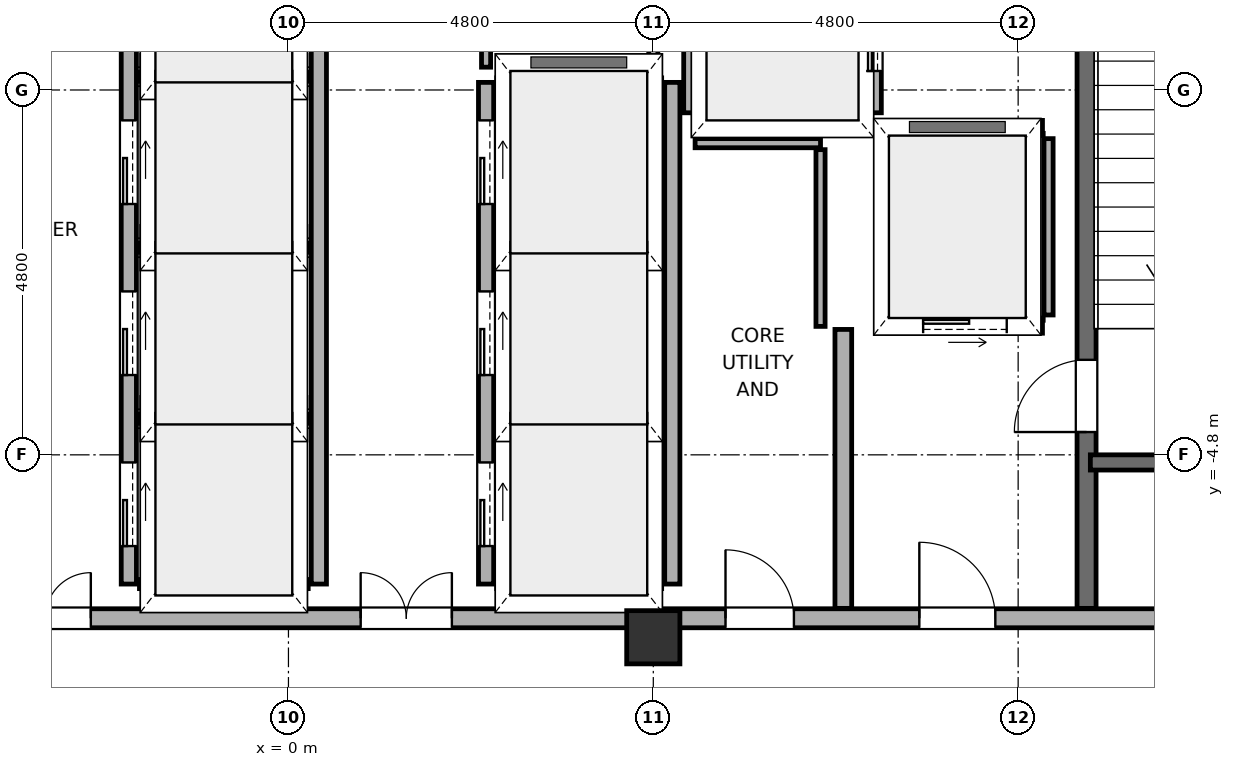
"""IFC4 building model, lengths in metres.
Left out: names, types, materials, properties, quantities, classifications, styles, units other than length and angle.
Written with IfcOpenShell. Run it as: python <this file> out.ifc"""

import sys

from ifc_helpers import new_model, si_unit, direction, frame, frame_2d, origin, origin_2d, place, context, subcontext, project, spatial, rectangle, hollow_rectangle, extrude, element, fill, save


model = new_model("IFC4")
c1 = context("Model", 3, precision=1e-05, world=origin(), true_north=direction((0.0, 1.0)))
c2 = subcontext(c1, "Body", "Model", "MODEL_VIEW")
j1 = project(units=[si_unit("LENGTHUNIT", "METRE"), si_unit("PLANEANGLEUNIT", "RADIAN")], contexts=[c1])
p1 = place(None, origin())
s1 = spatial("IfcSite", under=j1, at=p1, CompositionType="ELEMENT")
p2 = place(p1, origin())
s2 = spatial("IfcBuilding", under=s1, at=p2, CompositionType="ELEMENT")
p3 = place(p2, frame((0.0, 0.0, 180.3)))
s3 = spatial("IfcBuildingStorey", under=s2, at=p3, CompositionType="ELEMENT", Elevation=180.3)
p4 = place(p3, frame((4.8, -7.2, 0.0), z_axis=(0.0, 0.0, 1.0), x_axis=(1.0, 0.0, 0.0)))
e1 = element("IfcColumn", 1, at=p4, inside=s3, PredefinedType="COLUMN", context=c2, shape_type="SweptSolid", body=[
    extrude(hollow_rectangle(XDim=0.7, YDim=0.7, WallThickness=0.032, at=origin_2d()), origin(), (0.0, 0.0, 1.0), 5.2),
])
p5 = place(p3, frame((-4.6, -6.95, 0.0), z_axis=(0.0, 0.0, 1.0), x_axis=(1.0, 0.0, 0.0)))
e2 = element("IfcWall", 2, at=p5, inside=s3, PredefinedType="SOLIDWALL", context=c2, shape_type="SweptSolid", body=[
    extrude(rectangle(XDim=9.2, YDim=0.25, at=frame_2d((4.6, 0.0))), origin(), (0.0, 0.0, 1.0), 3.75),
])
p6 = place(p5, frame((0.8, 0.0, 0.0)))
e3 = element("IfcOpeningElement", 3, at=p6, cuts=e2, PredefinedType="OPENING", context=c2, shape_type="SweptSolid", body=[
    extrude(rectangle(XDim=1.2, YDim=2.2, at=frame_2d((0.6, 1.1))), frame((0.0, 0.14, 0.0), z_axis=(0.0, -1.0, 0.0), x_axis=(1.0, 0.0, 0.0)), (0.0, 0.0, 1.0), 0.28),
])
p7 = place(p5, frame((5.55, 0.0, 0.0)))
e4 = element("IfcOpeningElement", 4, at=p7, cuts=e2, PredefinedType="OPENING", context=c2, shape_type="SweptSolid", body=[
    extrude(rectangle(XDim=1.2, YDim=2.2, at=frame_2d((0.6, 1.1))), frame((0.0, 0.14, 0.0), z_axis=(0.0, -1.0, 0.0), x_axis=(1.0, 0.0, 0.0)), (0.0, 0.0, 1.0), 0.28),
])
p8 = place(p3, frame((4.8, -6.95, 0.0), z_axis=(0.0, 0.0, 1.0), x_axis=(1.0, 0.0, 0.0)))
e5 = element("IfcWall", 5, at=p8, inside=s3, PredefinedType="SOLIDWALL", context=c2, shape_type="SweptSolid", body=[
    extrude(rectangle(XDim=9.4, YDim=0.25, at=frame_2d((4.7, 0.0))), origin(), (0.0, 0.0, 1.0), 3.55),
])
p9 = place(p8, frame((3.5, 0.0, 0.0)))
e6 = element("IfcOpeningElement", 6, at=p9, cuts=e5, PredefinedType="OPENING", context=c2, shape_type="SweptSolid", body=[
    extrude(rectangle(XDim=1.0, YDim=2.15, at=frame_2d((0.5, 1.075))), frame((0.0, 0.14, 0.0), z_axis=(0.0, -1.0, 0.0), x_axis=(1.0, 0.0, 0.0)), (0.0, 0.0, 1.0), 0.28),
])
p10 = place(p8, frame((0.95, 0.0, 0.0)))
e7 = element("IfcOpeningElement", 7, at=p10, cuts=e5, PredefinedType="OPENING", context=c2, shape_type="SweptSolid", body=[
    extrude(rectangle(XDim=0.9, YDim=2.1, at=frame_2d((0.45, 1.05))), frame((0.0, 0.14, 0.0), z_axis=(0.0, -1.0, 0.0), x_axis=(1.0, 0.0, 0.0)), (0.0, 0.0, 1.0), 0.28),
])
p11 = place(p3, frame((7.3, -6.82, 0.0), z_axis=(0.0, 0.0, 1.0), x_axis=(0.0, 1.0, 0.0)))
e8 = element("IfcWall", 8, at=p11, inside=s3, PredefinedType="SOLIDWALL", context=c2, shape_type="SweptSolid", body=[
    extrude(rectangle(XDim=3.67, YDim=0.22, at=frame_2d((1.835, 0.0))), origin(), (0.0, 0.0, 1.0), 3.55),
])
p12 = place(p3, frame((10.5, -6.82, -0.22), z_axis=(0.0, 0.0, 1.0), x_axis=(0.0, 1.0, 0.0)))
e9 = element("IfcWall", 9, at=p12, inside=s3, PredefinedType="SOLIDWALL", context=c2, shape_type="SweptSolid", body=[
    extrude(rectangle(XDim=13.64, YDim=0.25, at=frame_2d((6.82, 0.0))), origin(), (0.0, 0.0, 1.0), 5.17),
])
p13 = place(p12, frame((2.32, 0.0, 0.22)))
e10 = element("IfcOpeningElement", 10, at=p13, cuts=e9, PredefinedType="OPENING", context=c2, shape_type="SweptSolid", body=[
    extrude(rectangle(XDim=0.95, YDim=2.15, at=frame_2d((0.475, 1.075))), frame((0.0, 0.14, 0.0), z_axis=(0.0, -1.0, 0.0), x_axis=(1.0, 0.0, 0.0)), (0.0, 0.0, 1.0), 0.28),
])
p14 = place(p3, frame((10.55, -4.9, -0.22), z_axis=(0.0, 0.0, 1.0), x_axis=(1.0, 0.0, 0.0)))
e11 = element("IfcWall", 11, at=p14, inside=s3, PredefinedType="SOLIDWALL", context=c2, shape_type="SweptSolid", body=[
    extrude(rectangle(XDim=3.65, YDim=0.2, at=frame_2d((1.825, 0.0))), origin(), (0.0, 0.0, 1.0), 5.17),
])
p15 = place(p3, frame((-2.1, -6.5, 0.0), z_axis=(0.0, 0.0, 1.0), x_axis=(0.0, 1.0, 0.0)))
e12 = element("IfcWall", 12, at=p15, inside=s3, PredefinedType="SOLIDWALL", context=c2, shape_type="SweptSolid", body=[
    extrude(rectangle(XDim=8.85, YDim=0.2, at=frame_2d((4.425, 0.0))), origin(), (0.0, 0.0, 1.0), 4.95),
])
p16 = place(p15, frame((0.5, 0.0, 0.0)))
e13 = element("IfcOpeningElement", 13, at=p16, cuts=e12, PredefinedType="OPENING", context=c2, shape_type="SweptSolid", body=[
    extrude(rectangle(XDim=1.1, YDim=2.2, at=frame_2d((0.55, 1.1))), frame((0.0, 0.115, 0.0), z_axis=(0.0, -1.0, 0.0), x_axis=(1.0, 0.0, 0.0)), (0.0, 0.0, 1.0), 0.23),
])
p17 = place(p15, frame((2.75, 0.0, 0.0)))
e14 = element("IfcOpeningElement", 14, at=p17, cuts=e12, PredefinedType="OPENING", context=c2, shape_type="SweptSolid", body=[
    extrude(rectangle(XDim=1.1, YDim=2.2, at=frame_2d((0.55, 1.1))), frame((0.0, 0.115, 0.0), z_axis=(0.0, -1.0, 0.0), x_axis=(1.0, 0.0, 0.0)), (0.0, 0.0, 1.0), 0.23),
])
p18 = place(p15, frame((5.0, 0.0, 0.0)))
e15 = element("IfcOpeningElement", 15, at=p18, cuts=e12, PredefinedType="OPENING", context=c2, shape_type="SweptSolid", body=[
    extrude(rectangle(XDim=1.1, YDim=2.2, at=frame_2d((0.55, 1.1))), frame((0.0, 0.115, 0.0), z_axis=(0.0, -1.0, 0.0), x_axis=(1.0, 0.0, 0.0)), (0.0, 0.0, 1.0), 0.23),
])
p19 = place(p15, frame((7.25, 0.0, 0.0)))
e16 = element("IfcOpeningElement", 16, at=p19, cuts=e12, PredefinedType="OPENING", context=c2, shape_type="SweptSolid", body=[
    extrude(rectangle(XDim=1.1, YDim=2.2, at=frame_2d((0.55, 1.1))), frame((0.0, 0.115, 0.0), z_axis=(0.0, -1.0, 0.0), x_axis=(1.0, 0.0, 0.0)), (0.0, 0.0, 1.0), 0.23),
])
p20 = place(p3, frame((0.4, -6.5, 0.0), z_axis=(0.0, 0.0, 1.0), x_axis=(0.0, 1.0, 0.0)))
e17 = element("IfcWall", 17, at=p20, inside=s3, PredefinedType="SOLIDWALL", context=c2, shape_type="SweptSolid", body=[
    extrude(rectangle(XDim=8.85, YDim=0.2, at=frame_2d((4.425, 0.0))), origin(), (0.0, 0.0, 1.0), 4.95),
])
for number, where, z_axis, x_axis in (
    (18, (-1.96, -6.5, 0.0), (0.0, 0.0, 1.0), (1.0, 0.0, 0.0)),
    (19, (-1.96, -4.325, 0.0), (0.0, 0.0, 1.0), (1.0, 0.0, 0.0)),
    (20, (-1.96, -2.075, 0.0), (0.0, 0.0, 1.0), (1.0, 0.0, 0.0)),
    (21, (-1.96, 0.175, 0.0), (0.0, 0.0, 1.0), (1.0, 0.0, 0.0)),
):
    element("IfcWall", number, at=place(p3, frame(where, z_axis=z_axis, x_axis=x_axis)), inside=s3, PredefinedType="PARTITIONING", context=c2, shape_type="SweptSolid", body=[
        extrude(rectangle(XDim=2.22, YDim=0.12, at=frame_2d((1.11, 0.0))), origin(), (0.0, 0.0, 1.0), 4.95),
    ])
p21 = place(p3, frame((2.6, -6.5, 0.0), z_axis=(0.0, 0.0, 1.0), x_axis=(0.0, 1.0, 0.0)))
e22 = element("IfcWall", 22, at=p21, inside=s3, PredefinedType="SOLIDWALL", context=c2, shape_type="SweptSolid", body=[
    extrude(rectangle(XDim=6.6, YDim=0.2, at=frame_2d((3.3, 0.0))), origin(), (0.0, 0.0, 1.0), 4.95),
])
p22 = place(p21, frame((0.5, 0.0, 0.0)))
e23 = element("IfcOpeningElement", 23, at=p22, cuts=e22, PredefinedType="OPENING", context=c2, shape_type="SweptSolid", body=[
    extrude(rectangle(XDim=1.1, YDim=2.2, at=frame_2d((0.55, 1.1))), frame((0.0, 0.115, 0.0), z_axis=(0.0, -1.0, 0.0), x_axis=(1.0, 0.0, 0.0)), (0.0, 0.0, 1.0), 0.23),
])
p23 = place(p21, frame((2.75, 0.0, 0.0)))
e24 = element("IfcOpeningElement", 24, at=p23, cuts=e22, PredefinedType="OPENING", context=c2, shape_type="SweptSolid", body=[
    extrude(rectangle(XDim=1.1, YDim=2.2, at=frame_2d((0.55, 1.1))), frame((0.0, 0.115, 0.0), z_axis=(0.0, -1.0, 0.0), x_axis=(1.0, 0.0, 0.0)), (0.0, 0.0, 1.0), 0.23),
])
p24 = place(p21, frame((5.0, 0.0, 0.0)))
e25 = element("IfcOpeningElement", 25, at=p24, cuts=e22, PredefinedType="OPENING", context=c2, shape_type="SweptSolid", body=[
    extrude(rectangle(XDim=1.1, YDim=2.2, at=frame_2d((0.55, 1.1))), frame((0.0, 0.115, 0.0), z_axis=(0.0, -1.0, 0.0), x_axis=(1.0, 0.0, 0.0)), (0.0, 0.0, 1.0), 0.23),
])
p25 = place(p3, frame((5.05, -6.5, 0.0), z_axis=(0.0, 0.0, 1.0), x_axis=(0.0, 1.0, 0.0)))
e26 = element("IfcWall", 26, at=p25, inside=s3, PredefinedType="SOLIDWALL", context=c2, shape_type="SweptSolid", body=[
    extrude(rectangle(XDim=6.6, YDim=0.2, at=frame_2d((3.3, 0.0))), origin(), (0.0, 0.0, 1.0), 4.95),
])
for number, where, z_axis, x_axis in (
    (27, (2.74, -6.5, 0.0), (0.0, 0.0, 1.0), (1.0, 0.0, 0.0)),
    (28, (2.74, -4.325, 0.0), (0.0, 0.0, 1.0), (1.0, 0.0, 0.0)),
    (29, (2.74, -2.075, 0.0), (0.0, 0.0, 1.0), (1.0, 0.0, 0.0)),
    (30, (2.74, 0.1, 0.0), (0.0, 0.0, 1.0), (1.0, 0.0, 0.0)),
):
    element("IfcWall", number, at=place(p3, frame(where, z_axis=z_axis, x_axis=x_axis)), inside=s3, PredefinedType="PARTITIONING", context=c2, shape_type="SweptSolid", body=[
        extrude(rectangle(XDim=2.17, YDim=0.12, at=frame_2d((1.085, 0.0))), origin(), (0.0, 0.0, 1.0), 4.95),
    ])
p26 = place(p3, frame((7.7, -0.3, 0.0), z_axis=(0.0, 0.0, 1.0), x_axis=(0.0, 1.0, 0.0)))
e31 = element("IfcWall", 31, at=p26, inside=s3, PredefinedType="SOLIDWALL", context=c2, shape_type="SweptSolid", body=[
    extrude(rectangle(XDim=6.8, YDim=0.2, at=frame_2d((3.4, 0.0))), origin(), (0.0, 0.0, 1.0), 4.95),
])
p27 = place(p26, frame((0.55, 0.0, 0.0)))
e32 = element("IfcOpeningElement", 32, at=p27, cuts=e31, PredefinedType="OPENING", context=c2, shape_type="SweptSolid", body=[
    extrude(rectangle(XDim=1.1, YDim=2.2, at=frame_2d((0.55, 1.1))), frame((0.0, 0.115, 0.0), z_axis=(0.0, -1.0, 0.0), x_axis=(1.0, 0.0, 0.0)), (0.0, 0.0, 1.0), 0.23),
])
p28 = place(p26, frame((2.9, 0.0, 0.0)))
e33 = element("IfcOpeningElement", 33, at=p28, cuts=e31, PredefinedType="OPENING", context=c2, shape_type="SweptSolid", body=[
    extrude(rectangle(XDim=1.1, YDim=2.2, at=frame_2d((0.55, 1.1))), frame((0.0, 0.115, 0.0), z_axis=(0.0, -1.0, 0.0), x_axis=(1.0, 0.0, 0.0)), (0.0, 0.0, 1.0), 0.23),
])
p29 = place(p26, frame((5.2, 0.0, 0.0)))
e34 = element("IfcOpeningElement", 34, at=p29, cuts=e31, PredefinedType="OPENING", context=c2, shape_type="SweptSolid", body=[
    extrude(rectangle(XDim=1.1, YDim=2.2, at=frame_2d((0.55, 1.1))), frame((0.0, 0.115, 0.0), z_axis=(0.0, -1.0, 0.0), x_axis=(1.0, 0.0, 0.0)), (0.0, 0.0, 1.0), 0.23),
])
p30 = place(p3, frame((5.3, -0.3, 0.0), z_axis=(0.0, 0.0, 1.0), x_axis=(0.0, 1.0, 0.0)))
e35 = element("IfcWall", 35, at=p30, inside=s3, PredefinedType="SOLIDWALL", context=c2, shape_type="SweptSolid", body=[
    extrude(rectangle(XDim=6.8, YDim=0.2, at=frame_2d((3.4, 0.0))), origin(), (0.0, 0.0, 1.0), 4.95),
])
p31 = place(p3, frame((5.44, -0.3, 0.0), z_axis=(0.0, 0.0, 1.0), x_axis=(1.0, 0.0, 0.0)))
e36 = element("IfcWall", 36, at=p31, inside=s3, PredefinedType="PARTITIONING", context=c2, shape_type="SweptSolid", body=[
    extrude(rectangle(XDim=2.12, YDim=0.12, at=frame_2d((1.06, 0.0))), origin(), (0.0, 0.0, 1.0), 4.95),
])
p32 = place(p3, frame((7.88, -3.1, 0.0), z_axis=(0.0, 0.0, 1.0), x_axis=(1.0, 0.0, 0.0)))
e37 = element("IfcWall", 37, at=p32, inside=s3, PredefinedType="SOLIDWALL", context=c2, shape_type="SweptSolid", body=[
    extrude(rectangle(XDim=2.04, YDim=0.2, at=frame_2d((1.02, 0.0))), origin(), (0.0, 0.0, 1.0), 4.95),
])
p33 = place(p32, frame((0.47, 0.0, 0.0)))
e38 = element("IfcOpeningElement", 38, at=p33, cuts=e37, PredefinedType="OPENING", context=c2, shape_type="SweptSolid", body=[
    extrude(rectangle(XDim=1.1, YDim=2.2, at=frame_2d((0.55, 1.1))), frame((0.0, 0.115, 0.0), z_axis=(0.0, -1.0, 0.0), x_axis=(1.0, 0.0, 0.0)), (0.0, 0.0, 1.0), 0.23),
])
p34 = place(p3, frame((7.88, -0.5, 0.0), z_axis=(0.0, 0.0, 1.0), x_axis=(1.0, 0.0, 0.0)))
e39 = element("IfcWall", 39, at=p34, inside=s3, PredefinedType="SOLIDWALL", context=c2, shape_type="SweptSolid", body=[
    extrude(rectangle(XDim=2.04, YDim=0.2, at=frame_2d((1.02, 0.0))), origin(), (0.0, 0.0, 1.0), 4.95),
])
for number, where, z_axis, x_axis in (
    (40, (7.8, -2.96, 0.0), (0.0, 0.0, 1.0), (0.0, 1.0, 0.0)),
    (41, (10.0, -2.96, 0.0), (0.0, 0.0, 1.0), (0.0, 1.0, 0.0)),
):
    element("IfcWall", number, at=place(p3, frame(where, z_axis=z_axis, x_axis=x_axis)), inside=s3, PredefinedType="PARTITIONING", context=c2, shape_type="SweptSolid", body=[
        extrude(rectangle(XDim=2.32, YDim=0.12, at=frame_2d((1.16, 0.0))), origin(), (0.0, 0.0, 1.0), 4.95),
    ])
p35 = place(p3, frame((5.35, -0.7, 0.0), z_axis=(0.0, 0.0, 1.0), x_axis=(1.0, 0.0, 0.0)))
e42 = element("IfcWall", 42, at=p35, inside=s3, PredefinedType="PARTITIONING", context=c2, shape_type="SweptSolid", body=[
    extrude(rectangle(XDim=1.65, YDim=0.12, at=frame_2d((0.825, 0.0))), origin(), (0.0, 0.0, 1.0), 4.95),
])
p36 = place(p3, frame((2.6, 0.3, 0.0), z_axis=(0.0, 0.0, 1.0), x_axis=(0.0, 1.0, 0.0)))
e43 = element("IfcWall", 43, at=p36, inside=s3, PredefinedType="PARTITIONING", context=c2, shape_type="SweptSolid", body=[
    extrude(rectangle(XDim=1.465, YDim=0.12, at=frame_2d((0.732, 0.0))), origin(), (0.0, 0.0, 1.0), 4.95),
])
p37 = place(p36, frame((0.345, 0.0, 0.0)))
e44 = element("IfcOpeningElement", 44, at=p37, cuts=e43, PredefinedType="OPENING", context=c2, shape_type="SweptSolid", body=[
    extrude(rectangle(XDim=0.9, YDim=2.1, at=frame_2d((0.45, 1.05))), frame((0.0, 0.075, 0.0), z_axis=(0.0, -1.0, 0.0), x_axis=(1.0, 0.0, 0.0)), (0.0, 0.0, 1.0), 0.15),
])
p38 = place(p3, frame((4.8, 0.3, 0.0), z_axis=(0.0, 0.0, 1.0), x_axis=(0.0, 1.0, 0.0)))
e45 = element("IfcWall", 45, at=p38, inside=s3, PredefinedType="PARTITIONING", context=c2, shape_type="SweptSolid", body=[
    extrude(rectangle(XDim=1.465, YDim=0.12, at=frame_2d((0.732, 0.0))), origin(), (0.0, 0.0, 1.0), 4.95),
])
p39 = place(p3, frame((7.0, -3.11, 0.0), z_axis=(0.0, 0.0, 1.0), x_axis=(0.0, 1.0, 0.0)))
e46 = element("IfcWall", 46, at=p39, inside=s3, PredefinedType="PARTITIONING", context=c2, shape_type="SweptSolid", body=[
    extrude(rectangle(XDim=2.325, YDim=0.12, at=frame_2d((1.163, 0.0))), origin(), (0.0, 0.0, 1.0), 4.95),
])
p40 = place(p9, origin())
e47 = element("IfcDoor", 47, at=p40, inside=s3, OperationType="SINGLE_SWING_LEFT", PredefinedType="DOOR", context=c2, shape_type="SweptSolid", body=[
    extrude(rectangle(XDim=1.0, YDim=2.15, at=frame_2d((0.5, 1.075))), frame((0.0, 0.025, 0.0), z_axis=(0.0, -1.0, 0.0), x_axis=(1.0, 0.0, 0.0)), (0.0, 0.0, 1.0), 0.05),
])
fill(e6, e47)
p41 = place(p6, origin())
e48 = element("IfcDoor", 48, at=p41, inside=s3, OperationType="DOUBLE_DOOR_SINGLE_SWING", PredefinedType="DOOR", context=c2, shape_type="SweptSolid", body=[
    extrude(rectangle(XDim=1.2, YDim=2.2, at=frame_2d((0.6, 1.1))), frame((0.0, 0.025, 0.0), z_axis=(0.0, -1.0, 0.0), x_axis=(1.0, 0.0, 0.0)), (0.0, 0.0, 1.0), 0.05),
])
fill(e3, e48)
p42 = place(p7, origin())
e49 = element("IfcDoor", 49, at=p42, inside=s3, OperationType="DOUBLE_DOOR_SINGLE_SWING", PredefinedType="DOOR", context=c2, shape_type="SweptSolid", body=[
    extrude(rectangle(XDim=1.2, YDim=2.2, at=frame_2d((0.6, 1.1))), frame((0.0, 0.025, 0.0), z_axis=(0.0, -1.0, 0.0), x_axis=(1.0, 0.0, 0.0)), (0.0, 0.0, 1.0), 0.05),
])
fill(e4, e49)
p43 = place(p13, origin())
e50 = element("IfcDoor", 50, at=p43, inside=s3, OperationType="SINGLE_SWING_LEFT", PredefinedType="DOOR", context=c2, shape_type="SweptSolid", body=[
    extrude(rectangle(XDim=0.95, YDim=2.15, at=frame_2d((0.475, 1.075))), frame((0.0, 0.025, 0.0), z_axis=(0.0, -1.0, 0.0), x_axis=(1.0, 0.0, 0.0)), (0.0, 0.0, 1.0), 0.05),
])
fill(e10, e50)
p44 = place(p16, origin())
e51 = element("IfcDoor", 51, at=p44, inside=s3, OperationType="SLIDING_TO_LEFT", PredefinedType="DOOR", context=c2, shape_type="SweptSolid", body=[
    extrude(rectangle(XDim=1.1, YDim=2.2, at=frame_2d((0.55, 1.1))), frame((0.0, 0.025, 0.0), z_axis=(0.0, -1.0, 0.0), x_axis=(1.0, 0.0, 0.0)), (0.0, 0.0, 1.0), 0.05),
])
fill(e13, e51)
p45 = place(p17, origin())
e52 = element("IfcDoor", 52, at=p45, inside=s3, OperationType="SLIDING_TO_LEFT", PredefinedType="DOOR", context=c2, shape_type="SweptSolid", body=[
    extrude(rectangle(XDim=1.1, YDim=2.2, at=frame_2d((0.55, 1.1))), frame((0.0, 0.025, 0.0), z_axis=(0.0, -1.0, 0.0), x_axis=(1.0, 0.0, 0.0)), (0.0, 0.0, 1.0), 0.05),
])
fill(e14, e52)
p46 = place(p18, origin())
e53 = element("IfcDoor", 53, at=p46, inside=s3, OperationType="SLIDING_TO_LEFT", PredefinedType="DOOR", context=c2, shape_type="SweptSolid", body=[
    extrude(rectangle(XDim=1.1, YDim=2.2, at=frame_2d((0.55, 1.1))), frame((0.0, 0.025, 0.0), z_axis=(0.0, -1.0, 0.0), x_axis=(1.0, 0.0, 0.0)), (0.0, 0.0, 1.0), 0.05),
])
fill(e15, e53)
p47 = place(p22, origin())
e54 = element("IfcDoor", 54, at=p47, inside=s3, OperationType="SLIDING_TO_LEFT", PredefinedType="DOOR", context=c2, shape_type="SweptSolid", body=[
    extrude(rectangle(XDim=1.1, YDim=2.2, at=frame_2d((0.55, 1.1))), frame((0.0, 0.025, 0.0), z_axis=(0.0, -1.0, 0.0), x_axis=(1.0, 0.0, 0.0)), (0.0, 0.0, 1.0), 0.05),
])
fill(e23, e54)
p48 = place(p23, origin())
e55 = element("IfcDoor", 55, at=p48, inside=s3, OperationType="SLIDING_TO_LEFT", PredefinedType="DOOR", context=c2, shape_type="SweptSolid", body=[
    extrude(rectangle(XDim=1.1, YDim=2.2, at=frame_2d((0.55, 1.1))), frame((0.0, 0.025, 0.0), z_axis=(0.0, -1.0, 0.0), x_axis=(1.0, 0.0, 0.0)), (0.0, 0.0, 1.0), 0.05),
])
fill(e24, e55)
p49 = place(p24, origin())
e56 = element("IfcDoor", 56, at=p49, inside=s3, OperationType="SLIDING_TO_LEFT", PredefinedType="DOOR", context=c2, shape_type="SweptSolid", body=[
    extrude(rectangle(XDim=1.1, YDim=2.2, at=frame_2d((0.55, 1.1))), frame((0.0, 0.025, 0.0), z_axis=(0.0, -1.0, 0.0), x_axis=(1.0, 0.0, 0.0)), (0.0, 0.0, 1.0), 0.05),
])
fill(e25, e56)
p50 = place(p27, origin())
e57 = element("IfcDoor", 57, at=p50, inside=s3, OperationType="SLIDING_TO_LEFT", PredefinedType="DOOR", context=c2, shape_type="SweptSolid", body=[
    extrude(rectangle(XDim=1.1, YDim=2.2, at=frame_2d((0.55, 1.1))), frame((0.0, 0.025, 0.0), z_axis=(0.0, -1.0, 0.0), x_axis=(1.0, 0.0, 0.0)), (0.0, 0.0, 1.0), 0.05),
])
fill(e32, e57)
p51 = place(p33, origin())
e58 = element("IfcDoor", 58, at=p51, inside=s3, OperationType="SLIDING_TO_LEFT", PredefinedType="DOOR", context=c2, shape_type="SweptSolid", body=[
    extrude(rectangle(XDim=1.1, YDim=2.2, at=frame_2d((0.55, 1.1))), frame((0.0, 0.025, 0.0), z_axis=(0.0, -1.0, 0.0), x_axis=(1.0, 0.0, 0.0)), (0.0, 0.0, 1.0), 0.05),
])
fill(e38, e58)
p52 = place(p10, origin())
e59 = element("IfcDoor", 59, at=p52, inside=s3, OperationType="SINGLE_SWING_LEFT", PredefinedType="DOOR", context=c2, shape_type="SweptSolid", body=[
    extrude(rectangle(XDim=0.9, YDim=2.1, at=frame_2d((0.45, 1.05))), frame((0.0, 0.025, 0.0), z_axis=(0.0, -1.0, 0.0), x_axis=(1.0, 0.0, 0.0)), (0.0, 0.0, 1.0), 0.05),
])
fill(e7, e59)
save(model, sys.argv[1])
